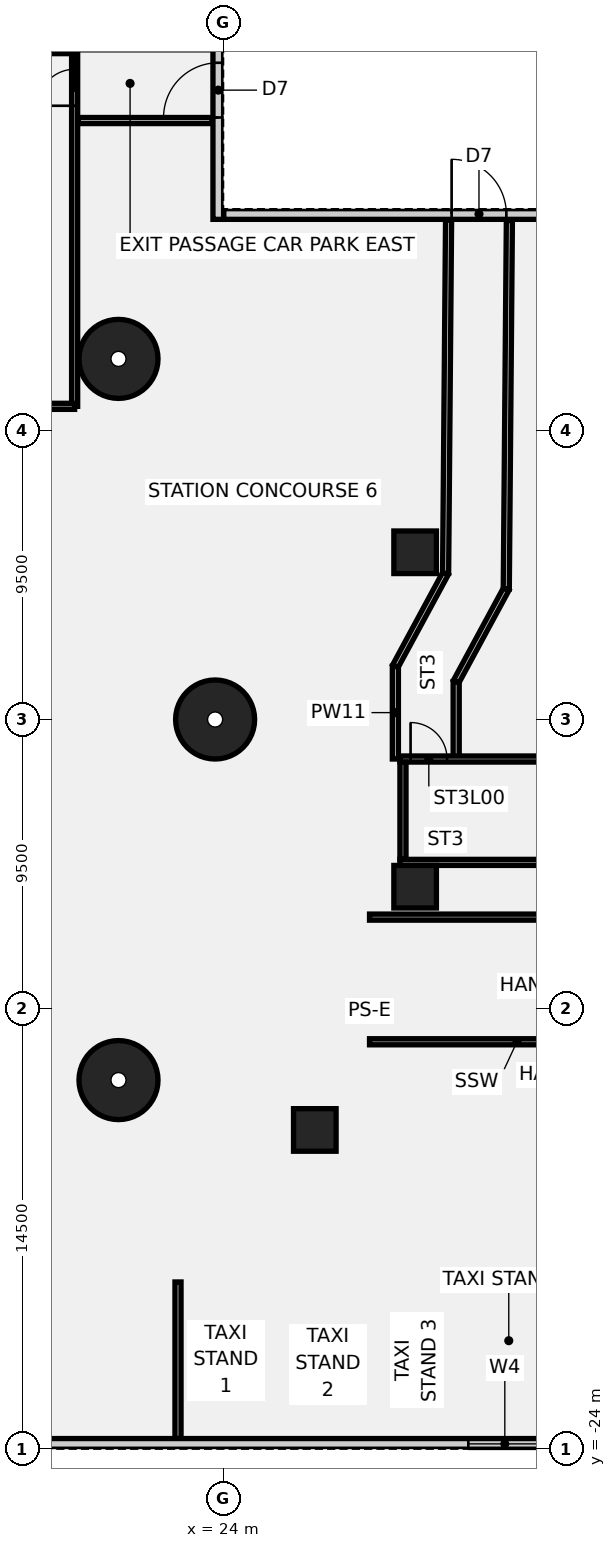
"""IFC4 building model, lengths in metres.
Left out: names, types, materials, properties, quantities, classifications, styles, units other than length and angle.
Written with IfcOpenShell. Run it as: python <this file> out.ifc"""

import sys

from ifc_helpers import new_model, si_unit, direction, frame, frame_2d, origin, origin_2d, place, context, subcontext, project, spatial, rectangle, circle, extrude, element, fill, save


model = new_model("IFC4")
c1 = context("Model", 3, precision=1e-05, world=origin(), true_north=direction((0.0, 1.0)))
c2 = subcontext(c1, "Body", "Model", "MODEL_VIEW")
j1 = project(units=[si_unit("LENGTHUNIT", "METRE"), si_unit("PLANEANGLEUNIT", "RADIAN")], contexts=[c1])
p1 = place(None, origin())
s1 = spatial("IfcSite", under=j1, at=p1, CompositionType="ELEMENT")
p2 = place(p1, origin())
s2 = spatial("IfcBuilding", under=s1, at=p2, CompositionType="ELEMENT")
p3 = place(p2, origin())
s3 = spatial("IfcBuildingStorey", under=s2, at=p3, CompositionType="ELEMENT", Elevation=0.0)
for number, where, z_axis, x_axis in (
    (1, (23.721, 0.0, -0.55), (0.0, 0.0, 1.0), (1.0, 0.0, 0.0)),
    (2, (20.543, 11.86, -0.55), (0.0, 0.0, 1.0), (1.0, 0.0, 0.0)),
    (3, (20.543, -11.86, -0.55), (0.0, 0.0, 1.0), (1.0, 0.0, 0.0)),
):
    element("IfcColumn", number, at=place(p3, frame(where, z_axis=z_axis, x_axis=x_axis)), inside=s3, PredefinedType="COLUMN", context=c2, shape_type="SweptSolid", body=[
        extrude(circle(Radius=1.3, at=origin_2d()), origin(), (0.0, 0.0, 1.0), 9.05),
    ])
for number, where, z_axis, x_axis in (
    (4, (30.3, 5.5, -0.55), (0.0, 0.0, 1.0), (1.0, 0.0, 0.0)),
    (5, (30.3, -5.5, -0.55), (0.0, 0.0, 1.0), (1.0, 0.0, 0.0)),
    (6, (27.0, -13.5, -0.55), (0.0, 0.0, 1.0), (1.0, 0.0, 0.0)),
):
    element("IfcColumn", number, at=place(p3, frame(where, z_axis=z_axis, x_axis=x_axis)), inside=s3, PredefinedType="COLUMN", context=c2, shape_type="SweptSolid", body=[
        extrude(rectangle(XDim=1.4, YDim=1.4, at=origin_2d()), origin(), (0.0, 0.0, 1.0), 9.05),
    ])
p4 = place(p3, frame((15.0, 22.0, 0.0), z_axis=(0.0, 0.0, 1.0), x_axis=(1.0, 0.0, 0.0)))
e7 = element("IfcWall", 7, at=p4, inside=s3, PredefinedType="PARTITIONING", context=c2, shape_type="SweptSolid", body=[
    extrude(rectangle(XDim=4.1, YDim=0.2, at=frame_2d((2.05, 0.0))), origin(), (0.0, 0.0, 1.0), 8.5),
])
p5 = place(p3, frame((19.1, 10.3, 0.0), z_axis=(0.0, 0.0, 1.0), x_axis=(0.0, 1.0, 0.0)))
e8 = element("IfcWall", 8, at=p5, inside=s3, PredefinedType="PARTITIONING", context=c2, shape_type="SweptSolid", body=[
    extrude(rectangle(XDim=11.7, YDim=0.2, at=frame_2d((5.85, 0.0))), origin(), (0.0, 0.0, 1.0), 8.5),
])
p6 = place(p5, frame((9.886, 0.0, 0.0)))
e9 = element("IfcOpeningElement", 9, at=p6, cuts=e8, PredefinedType="OPENING", context=c2, shape_type="SweptSolid", body=[
    extrude(rectangle(XDim=1.2, YDim=2.1, at=frame_2d((0.6, 1.05))), frame((0.0, 0.11, 0.0), z_axis=(0.0, -1.0, 0.0), x_axis=(1.0, 0.0, 0.0)), (0.0, 0.0, 1.0), 0.22),
])
p7 = place(p3, frame((15.0, 10.3, 0.0), z_axis=(0.0, 0.0, 1.0), x_axis=(1.0, 0.0, 0.0)))
e10 = element("IfcWall", 10, at=p7, inside=s3, PredefinedType="PARTITIONING", context=c2, shape_type="SweptSolid", body=[
    extrude(rectangle(XDim=4.1, YDim=0.2, at=frame_2d((2.05, 0.0))), origin(), (0.0, 0.0, 1.0), 8.5),
])
p8 = place(p3, frame((22.5, -18.5, 0.0), z_axis=(0.0, 0.0, 1.0), x_axis=(0.0, -1.0, 0.0)))
e11 = element("IfcWall", 11, at=p8, inside=s3, PredefinedType="PARTITIONING", context=c2, shape_type="SweptSolid", body=[
    extrude(rectangle(XDim=5.15, YDim=0.2, at=frame_2d((2.575, 0.0))), origin(), (0.0, 0.0, 1.0), 8.5),
])
p9 = place(p3, frame((29.65, -1.3, 0.0), z_axis=(0.0, 0.0, 1.0), x_axis=(0.0, 1.0, 0.0)))
e12 = element("IfcWall", 12, at=p9, inside=s3, PredefinedType="PARTITIONING", context=c2, shape_type="SweptSolid", body=[
    extrude(rectangle(XDim=3.053, YDim=0.2, at=frame_2d((1.527, 0.0))), origin(), (0.0, 0.0, 1.0), 8.5),
])
p10 = place(p3, frame((29.65, 1.753, 0.0), z_axis=(0.0, 0.0, 1.0), x_axis=(0.475809668513, 0.879548270051, 0.0)))
e13 = element("IfcWall", 13, at=p10, inside=s3, PredefinedType="PARTITIONING", context=c2, shape_type="SweptSolid", body=[
    extrude(rectangle(XDim=3.472, YDim=0.2, at=frame_2d((1.736, 0.0))), origin(), (0.0, 0.0, 1.0), 8.5),
])
p11 = place(p3, frame((31.302, 4.807, 0.0), z_axis=(0.0, 0.0, 1.0), x_axis=(0.008423893865, 0.999964518377, 0.0)))
e14 = element("IfcWall", 14, at=p11, inside=s3, PredefinedType="PARTITIONING", context=c2, shape_type="SweptSolid", body=[
    extrude(rectangle(XDim=11.622, YDim=0.2, at=frame_2d((5.811, 0.0))), origin(), (0.0, 0.0, 1.0), 8.5),
])
p12 = place(p3, frame((31.65, -1.3, 0.0), z_axis=(0.0, 0.0, 1.0), x_axis=(0.0, 1.0, 0.0)))
e15 = element("IfcWall", 15, at=p12, inside=s3, PredefinedType="PARTITIONING", context=c2, shape_type="SweptSolid", body=[
    extrude(rectangle(XDim=2.547, YDim=0.2, at=frame_2d((1.273, 0.0))), origin(), (0.0, 0.0, 1.0), 8.5),
])
p13 = place(p3, frame((31.65, 1.247, 0.0), z_axis=(0.0, 0.0, 1.0), x_axis=(0.475826631437, 0.879539093398, 0.0)))
e16 = element("IfcWall", 16, at=p13, inside=s3, PredefinedType="PARTITIONING", context=c2, shape_type="SweptSolid", body=[
    extrude(rectangle(XDim=3.463, YDim=0.2, at=frame_2d((1.732, 0.0))), origin(), (0.0, 0.0, 1.0), 8.5),
])
p14 = place(p3, frame((33.298, 4.293, 0.0), z_axis=(0.0, 0.0, 1.0), x_axis=(0.008420669246, 0.999964545536, 0.0)))
e17 = element("IfcWall", 17, at=p14, inside=s3, PredefinedType="PARTITIONING", context=c2, shape_type="SweptSolid", body=[
    extrude(rectangle(XDim=12.119, YDim=0.2, at=frame_2d((6.06, 0.0))), origin(), (0.0, 0.0, 1.0), 8.5),
])
p15 = place(p3, frame((19.22, 19.7, 0.0), z_axis=(0.0, 0.0, 1.0), x_axis=(1.0, 0.0, 0.0)))
e18 = element("IfcWall", 18, at=p15, inside=s3, PredefinedType="PARTITIONING", context=c2, shape_type="SweptSolid", body=[
    extrude(rectangle(XDim=4.4, YDim=0.2, at=frame_2d((2.2, 0.0))), origin(), (0.0, 0.0, 1.0), 8.5),
])
for number, where, z_axis, x_axis in (
    (19, (28.8, -10.6, 0.0), (0.0, 0.0, 1.0), (1.0, 0.0, 0.0)),
    (20, (28.8, -6.5, 0.0), (0.0, 0.0, 1.0), (1.0, 0.0, 0.0)),
):
    element("IfcWall", number, at=place(p3, frame(where, z_axis=z_axis, x_axis=x_axis)), inside=s3, PredefinedType="SOLIDWALL", context=c2, shape_type="SweptSolid", body=[
        extrude(rectangle(XDim=9.7, YDim=0.2, at=frame_2d((4.85, 0.0))), origin(), (0.0, 0.0, 1.0), 8.5),
    ])
p16 = place(p3, frame((24.0, 16.625, 0.0), z_axis=(0.0, 0.0, 1.0), x_axis=(1.0, 0.0, 0.0)))
e21 = element("IfcWall", 21, at=p16, inside=s3, PredefinedType="SOLIDWALL", context=c2, shape_type="SweptSolid", body=[
    extrude(rectangle(XDim=18.0, YDim=0.35, at=frame_2d((9.0, 0.0))), origin(), (0.0, 0.0, 1.0), 8.5),
])
p17 = place(p16, frame((7.5, 0.0, 0.0)))
e22 = element("IfcOpeningElement", 22, at=p17, cuts=e21, PredefinedType="OPENING", context=c2, shape_type="SweptSolid", body=[
    extrude(rectangle(XDim=1.8, YDim=2.4, at=frame_2d((0.9, 1.2))), frame((0.0, 0.185, 0.0), z_axis=(0.0, -1.0, 0.0), x_axis=(1.0, 0.0, 0.0)), (0.0, 0.0, 1.0), 0.37),
])
p18 = place(p16, frame((14.55, 0.0, 1.0)))
e23 = element("IfcOpeningElement", 23, at=p18, cuts=e21, PredefinedType="OPENING", context=c2, shape_type="SweptSolid", body=[
    extrude(rectangle(XDim=2.4, YDim=1.8, at=frame_2d((1.2, 0.9))), frame((0.0, 0.185, 0.0), z_axis=(0.0, -1.0, 0.0), x_axis=(1.0, 0.0, 0.0)), (0.0, 0.0, 1.0), 0.37),
])
p19 = place(p3, frame((23.825, 16.45, 0.0), z_axis=(0.0, 0.0, 1.0), x_axis=(0.0, 1.0, 0.0)))
e24 = element("IfcWall", 24, at=p19, inside=s3, PredefinedType="SOLIDWALL", context=c2, shape_type="SweptSolid", body=[
    extrude(rectangle(XDim=27.4, YDim=0.35, at=frame_2d((13.7, 0.0))), origin(), (0.0, 0.0, 1.0), 8.5),
])
p20 = place(p19, frame((3.35, 0.0, 0.0)))
e25 = element("IfcOpeningElement", 25, at=p20, cuts=e24, PredefinedType="OPENING", context=c2, shape_type="SweptSolid", body=[
    extrude(rectangle(XDim=1.8, YDim=2.4, at=frame_2d((0.9, 1.2))), frame((0.0, 0.185, 0.0), z_axis=(0.0, -1.0, 0.0), x_axis=(1.0, 0.0, 0.0)), (0.0, 0.0, 1.0), 0.37),
])
p21 = place(p19, frame((24.35, 0.0, 0.0)))
e26 = element("IfcOpeningElement", 26, at=p21, cuts=e24, PredefinedType="OPENING", context=c2, shape_type="SweptSolid", body=[
    extrude(rectangle(XDim=1.8, YDim=2.4, at=frame_2d((0.9, 1.2))), frame((0.0, 0.185, 0.0), z_axis=(0.0, -1.0, 0.0), x_axis=(1.0, 0.0, 0.0)), (0.0, 0.0, 1.0), 0.37),
])
p22 = place(p19, frame((14.9, 0.0, 1.0)))
e27 = element("IfcOpeningElement", 27, at=p22, cuts=e24, PredefinedType="OPENING", context=c2, shape_type="SweptSolid", body=[
    extrude(rectangle(XDim=2.4, YDim=1.8, at=frame_2d((1.2, 0.9))), frame((0.0, 0.185, 0.0), z_axis=(0.0, -1.0, 0.0), x_axis=(1.0, 0.0, 0.0)), (0.0, 0.0, 1.0), 0.37),
])
p23 = place(p3, frame((16.8, -23.825, 0.0), z_axis=(0.0, 0.0, 1.0), x_axis=(1.0, 0.0, 0.0)))
e28 = element("IfcWall", 28, at=p23, inside=s3, PredefinedType="SOLIDWALL", context=c2, shape_type="SweptSolid", body=[
    extrude(rectangle(XDim=26.7, YDim=0.35, at=frame_2d((13.35, 0.0))), origin(), (0.0, 0.0, 1.0), 8.5),
])
p24 = place(p23, frame((15.25, 0.0, 1.0)))
e29 = element("IfcOpeningElement", 29, at=p24, cuts=e28, PredefinedType="OPENING", context=c2, shape_type="SweptSolid", body=[
    extrude(rectangle(XDim=2.4, YDim=1.8, at=frame_2d((1.2, 0.9))), frame((0.0, 0.185, 0.0), z_axis=(0.0, -1.0, 0.0), x_axis=(1.0, 0.0, 0.0)), (0.0, 0.0, 1.0), 0.37),
])
p25 = place(p3, frame((29.8, -1.3, 0.0), z_axis=(0.0, 0.0, 1.0), x_axis=(1.0, 0.0, 0.0)))
e30 = element("IfcWall", 30, at=p25, inside=s3, PredefinedType="SHEAR", context=c2, shape_type="SweptSolid", body=[
    extrude(rectangle(XDim=6.7, YDim=0.2, at=frame_2d((3.35, 0.0))), origin(), (0.0, 0.0, 1.0), 8.5),
])
p26 = place(p25, frame((0.35, 0.0, 0.0)))
e31 = element("IfcOpeningElement", 31, at=p26, cuts=e30, PredefinedType="OPENING", context=c2, shape_type="SweptSolid", body=[
    extrude(rectangle(XDim=1.2, YDim=2.1, at=frame_2d((0.6, 1.05))), frame((0.0, 0.11, 0.0), z_axis=(0.0, -1.0, 0.0), x_axis=(1.0, 0.0, 0.0)), (0.0, 0.0, 1.0), 0.22),
])
p27 = place(p3, frame((29.8, -4.7, 0.0), z_axis=(0.0, 0.0, 1.0), x_axis=(1.0, 0.0, 0.0)))
e32 = element("IfcWall", 32, at=p27, inside=s3, PredefinedType="SHEAR", context=c2, shape_type="SweptSolid", body=[
    extrude(rectangle(XDim=6.7, YDim=0.2, at=frame_2d((3.35, 0.0))), origin(), (0.0, 0.0, 1.0), 8.5),
])
p28 = place(p3, frame((29.9, -4.6, 0.0), z_axis=(0.0, 0.0, 1.0), x_axis=(0.0, 1.0, 0.0)))
e33 = element("IfcWall", 33, at=p28, inside=s3, PredefinedType="SHEAR", context=c2, shape_type="SweptSolid", body=[
    extrude(rectangle(XDim=3.2, YDim=0.2, at=frame_2d((1.6, 0.0))), origin(), (0.0, 0.0, 1.0), 8.5),
])
p29 = place(p6, origin())
e34 = element("IfcDoor", 34, at=p29, inside=s3, OperationType="SINGLE_SWING_RIGHT", PredefinedType="DOOR", context=c2, shape_type="SweptSolid", body=[
    extrude(rectangle(XDim=1.2, YDim=2.1, at=frame_2d((0.6, 1.05))), frame((0.0, 0.025, 0.0), z_axis=(0.0, -1.0, 0.0), x_axis=(1.0, 0.0, 0.0)), (0.0, 0.0, 1.0), 0.05),
])
fill(e9, e34)
p30 = place(p17, origin())
e35 = element("IfcDoor", 35, at=p30, inside=s3, OperationType="SINGLE_SWING_LEFT", PredefinedType="DOOR", context=c2, shape_type="SweptSolid", body=[
    extrude(rectangle(XDim=1.8, YDim=2.4, at=frame_2d((0.9, 1.2))), frame((0.0, 0.025, 0.0), z_axis=(0.0, -1.0, 0.0), x_axis=(1.0, 0.0, 0.0)), (0.0, 0.0, 1.0), 0.05),
])
fill(e22, e35)
p31 = place(p20, frame((1.8, 0.0, 0.0), z_axis=(0.0, 0.0, 1.0), x_axis=(-1.0, 0.0, 0.0)))
e36 = element("IfcDoor", 36, at=p31, inside=s3, OperationType="SINGLE_SWING_LEFT", PredefinedType="DOOR", context=c2, shape_type="SweptSolid", body=[
    extrude(rectangle(XDim=1.8, YDim=2.4, at=frame_2d((0.9, 1.2))), frame((0.0, 0.025, 0.0), z_axis=(0.0, -1.0, 0.0), x_axis=(1.0, 0.0, 0.0)), (0.0, 0.0, 1.0), 0.05),
])
fill(e25, e36)
p32 = place(p24, origin())
e37 = element("IfcWindow", 37, at=p32, inside=s3, PartitioningType="SINGLE_PANEL", PredefinedType="WINDOW", context=c2, shape_type="SweptSolid", body=[
    extrude(rectangle(XDim=2.4, YDim=1.8, at=frame_2d((1.2, 0.9))), frame((0.0, 0.03, 0.0), z_axis=(0.0, -1.0, 0.0), x_axis=(1.0, 0.0, 0.0)), (0.0, 0.0, 1.0), 0.06),
])
fill(e29, e37)
p33 = place(p26, origin())
e38 = element("IfcDoor", 38, at=p33, inside=s3, OperationType="SINGLE_SWING_LEFT", PredefinedType="DOOR", context=c2, shape_type="SweptSolid", body=[
    extrude(rectangle(XDim=1.2, YDim=2.1, at=frame_2d((0.6, 1.05))), frame((0.0, 0.025, 0.0), z_axis=(0.0, -1.0, 0.0), x_axis=(1.0, 0.0, 0.0)), (0.0, 0.0, 1.0), 0.05),
])
fill(e31, e38)
save(model, sys.argv[1])
